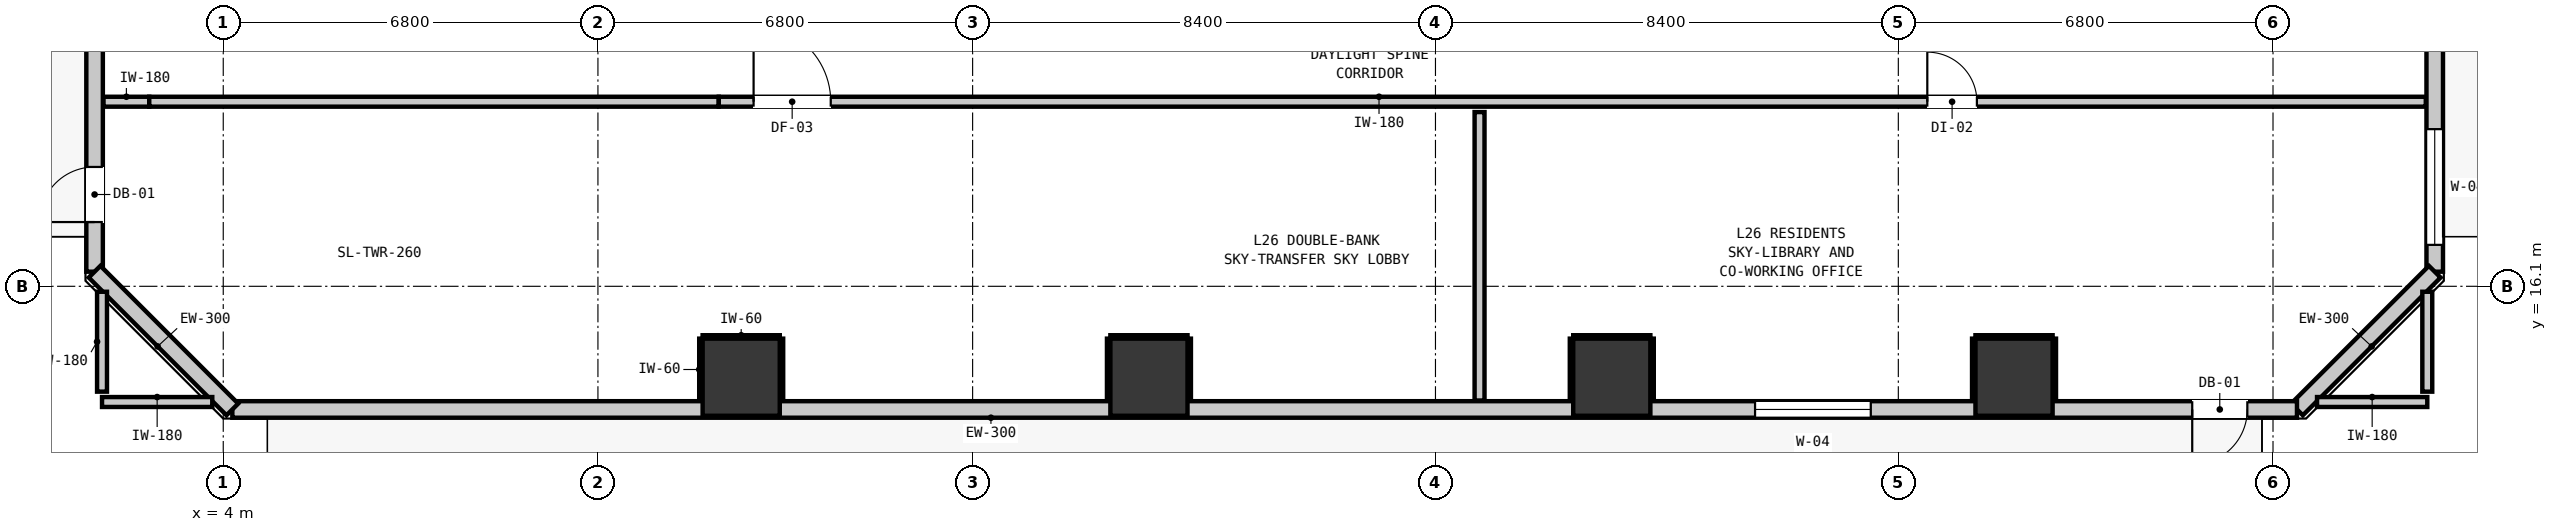
"""IFC4 building model, lengths in metres.
Left out: names, types, materials, properties, quantities, classifications, styles, units other than length and angle.
Written with IfcOpenShell. Run it as: python <this file> out.ifc"""

import sys

from ifc_helpers import new_model, si_unit, direction, frame, frame_2d, origin, origin_2d, place, context, subcontext, project, spatial, rectangle, extrude, element, fill, save


model = new_model("IFC4")
c1 = context("Model", 3, precision=1e-05, world=origin(), true_north=direction((0.0, 1.0)))
c2 = subcontext(c1, "Body", "Model", "MODEL_VIEW")
j1 = project(units=[si_unit("LENGTHUNIT", "METRE"), si_unit("PLANEANGLEUNIT", "RADIAN")], contexts=[c1])
p1 = place(None, origin())
s1 = spatial("IfcSite", under=j1, at=p1, CompositionType="ELEMENT")
p2 = place(p1, origin())
s2 = spatial("IfcBuilding", under=s1, at=p2, CompositionType="ELEMENT")
p3 = place(p2, frame((0.0, 0.0, 92.8)))
s3 = spatial("IfcBuildingStorey", under=s2, at=p3, CompositionType="ELEMENT", Elevation=92.8)
for number, where, z_axis, x_axis in (
    (1, (13.4, 14.45, 0.0), (0.0, 0.0, 1.0), (1.0, 0.0, 0.0)),
    (2, (20.8, 14.45, 0.0), (0.0, 0.0, 1.0), (1.0, 0.0, 0.0)),
    (3, (29.2, 14.45, 0.0), (0.0, 0.0, 1.0), (1.0, 0.0, 0.0)),
    (4, (36.5, 14.45, 0.0), (0.0, 0.0, 1.0), (1.0, 0.0, 0.0)),
):
    element("IfcColumn", number, at=place(p3, frame(where, z_axis=z_axis, x_axis=x_axis)), inside=s3, PredefinedType="COLUMN", context=c2, shape_type="SweptSolid", body=[
        extrude(rectangle(XDim=1.4, YDim=1.4, at=origin_2d()), origin(), (0.0, 0.0, 1.0), 3.32),
    ])
p4 = place(p3, frame((1.665, 16.365, 0.0), z_axis=(0.0, 0.0, 1.0), x_axis=(0.0, 1.0, 0.0)))
e5 = element("IfcWall", 5, at=p4, inside=s3, PredefinedType="STANDARD", context=c2, shape_type="SweptSolid", body=[
    extrude(rectangle(XDim=34.67, YDim=0.3, at=frame_2d((17.335, 0.0))), origin(), (0.0, 0.0, 1.0), 3.06),
])
p5 = place(p4, frame((0.901, 0.0, 0.0)))
e6 = element("IfcOpeningElement", 6, at=p5, cuts=e5, PredefinedType="OPENING", context=c2, shape_type="SweptSolid", body=[
    extrude(rectangle(XDim=1.0, YDim=2.15, at=frame_2d((0.5, 1.075))), frame((0.0, 0.16, 0.0), z_axis=(0.0, -1.0, 0.0), x_axis=(1.0, 0.0, 0.0)), (0.0, 0.0, 1.0), 0.32),
])
p6 = place(p4, frame((32.314, 0.0, 0.85)))
e7 = element("IfcOpeningElement", 7, at=p6, cuts=e5, PredefinedType="OPENING", context=c2, shape_type="SweptSolid", body=[
    extrude(rectangle(XDim=2.1, YDim=1.9, at=frame_2d((1.05, 0.95))), frame((0.0, 0.16, 0.0), z_axis=(0.0, -1.0, 0.0), x_axis=(1.0, 0.0, 0.0)), (0.0, 0.0, 1.0), 0.32),
])
p7 = place(p3, frame((44.135, 51.035, 0.0), z_axis=(0.0, 0.0, 1.0), x_axis=(0.0, -1.0, 0.0)))
e8 = element("IfcWall", 8, at=p7, inside=s3, PredefinedType="STANDARD", context=c2, shape_type="SweptSolid", body=[
    extrude(rectangle(XDim=34.67, YDim=0.3, at=frame_2d((17.335, 0.0))), origin(), (0.0, 0.0, 1.0), 3.06),
])
p8 = place(p7, frame((0.901, 0.0, 0.0)))
e9 = element("IfcOpeningElement", 9, at=p8, cuts=e8, PredefinedType="OPENING", context=c2, shape_type="SweptSolid", body=[
    extrude(rectangle(XDim=1.0, YDim=2.15, at=frame_2d((0.5, 1.075))), frame((0.0, 0.16, 0.0), z_axis=(0.0, -1.0, 0.0), x_axis=(1.0, 0.0, 0.0)), (0.0, 0.0, 1.0), 0.32),
])
p9 = place(p7, frame((32.083, 0.0, 0.85)))
e10 = element("IfcOpeningElement", 10, at=p9, cuts=e8, PredefinedType="OPENING", context=c2, shape_type="SweptSolid", body=[
    extrude(rectangle(XDim=2.1, YDim=1.9, at=frame_2d((1.05, 0.95))), frame((0.0, 0.16, 0.0), z_axis=(0.0, -1.0, 0.0), x_axis=(1.0, 0.0, 0.0)), (0.0, 0.0, 1.0), 0.32),
])
p10 = place(p7, frame((21.76, 0.0, 0.85)))
e11 = element("IfcOpeningElement", 11, at=p10, cuts=e8, PredefinedType="OPENING", context=c2, shape_type="SweptSolid", body=[
    extrude(rectangle(XDim=2.1, YDim=1.9, at=frame_2d((1.05, 0.95))), frame((0.0, 0.16, 0.0), z_axis=(0.0, -1.0, 0.0), x_axis=(1.0, 0.0, 0.0)), (0.0, 0.0, 1.0), 0.32),
])
p11 = place(p3, frame((44.135, 16.365, 0.0), z_axis=(0.0, 0.0, 1.0), x_axis=(-0.707106781187, -0.707106781187, 0.0)))
e12 = element("IfcWall", 12, at=p11, inside=s3, PredefinedType="STANDARD", context=c2, shape_type="SweptSolid", body=[
    extrude(rectangle(XDim=3.536, YDim=0.3, at=frame_2d((1.768, 0.0))), origin(), (0.0, 0.0, 1.0), 3.06),
])
p12 = place(p3, frame((41.635, 13.865, 0.0), z_axis=(0.0, 0.0, 1.0), x_axis=(-1.0, 0.0, 0.0)))
e13 = element("IfcWall", 13, at=p12, inside=s3, PredefinedType="STANDARD", context=c2, shape_type="SweptSolid", body=[
    extrude(rectangle(XDim=37.47, YDim=0.3, at=frame_2d((18.735, 0.0))), origin(), (0.0, 0.0, 1.0), 3.06),
])
p13 = place(p12, frame((0.901, 0.0, 0.0)))
e14 = element("IfcOpeningElement", 14, at=p13, cuts=e13, PredefinedType="OPENING", context=c2, shape_type="SweptSolid", body=[
    extrude(rectangle(XDim=1.0, YDim=2.15, at=frame_2d((0.5, 1.075))), frame((0.0, 0.16, 0.0), z_axis=(0.0, -1.0, 0.0), x_axis=(1.0, 0.0, 0.0)), (0.0, 0.0, 1.0), 0.32),
])
p14 = place(p12, frame((7.735, 0.0, 0.85)))
e15 = element("IfcOpeningElement", 15, at=p14, cuts=e13, PredefinedType="OPENING", context=c2, shape_type="SweptSolid", body=[
    extrude(rectangle(XDim=2.1, YDim=1.9, at=frame_2d((1.05, 0.95))), frame((0.0, 0.16, 0.0), z_axis=(0.0, -1.0, 0.0), x_axis=(1.0, 0.0, 0.0)), (0.0, 0.0, 1.0), 0.32),
])
p15 = place(p3, frame((4.165, 13.865, 0.0), z_axis=(0.0, 0.0, 1.0), x_axis=(-0.707106781187, 0.707106781187, 0.0)))
e16 = element("IfcWall", 16, at=p15, inside=s3, PredefinedType="STANDARD", context=c2, shape_type="SweptSolid", body=[
    extrude(rectangle(XDim=3.536, YDim=0.3, at=frame_2d((1.768, 0.0))), origin(), (0.0, 0.0, 1.0), 3.06),
])
for number, where, z_axis, x_axis in (
    (17, (1.8, 14.0, 0.0), (0.0, 0.0, 1.0), (1.0, 0.0, 0.0)),
    (18, (41.999, 14.0, 0.0), (0.0, 0.0, 1.0), (1.0, 0.0, 0.0)),
):
    element("IfcWall", number, at=place(p3, frame(where, z_axis=z_axis, x_axis=x_axis)), inside=s3, PredefinedType="PARTITIONING", context=c2, shape_type="SweptSolid", body=[
        extrude(rectangle(XDim=2.001, YDim=0.18, at=frame_2d((1.0, 0.0))), origin(), (0.0, 0.0, 1.0), 3.06),
    ])
p16 = place(p3, frame((1.827, 19.45, 0.0), z_axis=(0.0, 0.0, 1.0), x_axis=(1.0, 0.0, 0.0)))
e19 = element("IfcWall", 19, at=p16, inside=s3, PredefinedType="PARTITIONING", context=c2, shape_type="SweptSolid", body=[
    extrude(rectangle(XDim=0.83, YDim=0.18, at=frame_2d((0.415, 0.0))), origin(), (0.0, 0.0, 1.0), 3.06),
])
p17 = place(p3, frame((2.657, 19.45, 0.0), z_axis=(0.0, 0.0, 1.0), x_axis=(1.0, 0.0, 0.0)))
e20 = element("IfcWall", 20, at=p17, inside=s3, PredefinedType="PARTITIONING", context=c2, shape_type="SweptSolid", body=[
    extrude(rectangle(XDim=10.336, YDim=0.18, at=frame_2d((5.168, 0.0))), origin(), (0.0, 0.0, 1.0), 2.445),
])
p18 = place(p3, frame((12.993, 19.45, 0.0), z_axis=(0.0, 0.0, 1.0), x_axis=(1.0, 0.0, 0.0)))
e21 = element("IfcWall", 21, at=p18, inside=s3, PredefinedType="PARTITIONING", context=c2, shape_type="SweptSolid", body=[
    extrude(rectangle(XDim=30.98, YDim=0.18, at=frame_2d((15.49, 0.0))), origin(), (0.0, 0.0, 1.0), 3.06),
])
p19 = place(p18, frame((0.632, 0.0, 0.0)))
e22 = element("IfcOpeningElement", 22, at=p19, cuts=e21, PredefinedType="OPENING", context=c2, shape_type="SweptSolid", body=[
    extrude(rectangle(XDim=1.4, YDim=2.15, at=frame_2d((0.7, 1.075))), frame((0.0, 0.1, 0.0), z_axis=(0.0, -1.0, 0.0), x_axis=(1.0, 0.0, 0.0)), (0.0, 0.0, 1.0), 0.2),
])
p20 = place(p18, frame((21.933, 0.0, 0.0)))
e23 = element("IfcOpeningElement", 23, at=p20, cuts=e21, PredefinedType="OPENING", context=c2, shape_type="SweptSolid", body=[
    extrude(rectangle(XDim=0.9, YDim=2.1, at=frame_2d((0.45, 1.05))), frame((0.0, 0.1, 0.0), z_axis=(0.0, -1.0, 0.0), x_axis=(1.0, 0.0, 0.0)), (0.0, 0.0, 1.0), 0.2),
])
p21 = place(p3, frame((1.8, 14.188, 0.0), z_axis=(0.0, 0.0, 1.0), x_axis=(0.0, 1.0, 0.0)))
e24 = element("IfcWall", 24, at=p21, inside=s3, PredefinedType="PARTITIONING", context=c2, shape_type="SweptSolid", body=[
    extrude(rectangle(XDim=1.813, YDim=0.18, at=frame_2d((0.906, 0.0))), origin(), (0.0, 0.0, 1.0), 3.06),
])
p22 = place(p3, frame((26.8, 14.027, 0.0), z_axis=(0.0, 0.0, 1.0), x_axis=(0.0, 1.0, 0.0)))
e25 = element("IfcWall", 25, at=p22, inside=s3, PredefinedType="PARTITIONING", context=c2, shape_type="SweptSolid", body=[
    extrude(rectangle(XDim=5.235, YDim=0.18, at=frame_2d((2.617, 0.0))), origin(), (0.0, 0.0, 1.0), 3.06),
])
p23 = place(p3, frame((44.0, 14.188, 0.0), z_axis=(0.0, 0.0, 1.0), x_axis=(0.0, 1.0, 0.0)))
e26 = element("IfcWall", 26, at=p23, inside=s3, PredefinedType="PARTITIONING", context=c2, shape_type="SweptSolid", body=[
    extrude(rectangle(XDim=1.813, YDim=0.18, at=frame_2d((0.906, 0.0))), origin(), (0.0, 0.0, 1.0), 3.06),
])
p24 = place(p3, frame((12.7, 15.182, 0.0), z_axis=(0.0, 0.0, 1.0), x_axis=(1.0, 0.0, 0.0)))
e27 = element("IfcWall", 27, at=p24, inside=s3, PredefinedType="PARTITIONING", context=c2, shape_type="SweptSolid", body=[
    extrude(rectangle(XDim=1.4, YDim=0.06, at=frame_2d((0.7, 0.0))), origin(), (0.0, 0.0, 1.0), 1.45),
])
for number, where, z_axis, x_axis in (
    (28, (12.668, 14.03, 0.0), (0.0, 0.0, 1.0), (0.0, 1.0, 0.0)),
    (29, (14.132, 14.03, 0.0), (0.0, 0.0, 1.0), (0.0, 1.0, 0.0)),
):
    element("IfcWall", number, at=place(p3, frame(where, z_axis=z_axis, x_axis=x_axis)), inside=s3, PredefinedType="PARTITIONING", context=c2, shape_type="SweptSolid", body=[
        extrude(rectangle(XDim=1.12, YDim=0.06, at=frame_2d((0.56, 0.0))), origin(), (0.0, 0.0, 1.0), 1.45),
    ])
p25 = place(p3, frame((20.1, 15.182, 0.0), z_axis=(0.0, 0.0, 1.0), x_axis=(1.0, 0.0, 0.0)))
e30 = element("IfcWall", 30, at=p25, inside=s3, PredefinedType="PARTITIONING", context=c2, shape_type="SweptSolid", body=[
    extrude(rectangle(XDim=1.4, YDim=0.06, at=frame_2d((0.7, 0.0))), origin(), (0.0, 0.0, 1.0), 1.45),
])
for number, where, z_axis, x_axis in (
    (31, (20.068, 14.03, 0.0), (0.0, 0.0, 1.0), (0.0, 1.0, 0.0)),
    (32, (21.532, 14.03, 0.0), (0.0, 0.0, 1.0), (0.0, 1.0, 0.0)),
):
    element("IfcWall", number, at=place(p3, frame(where, z_axis=z_axis, x_axis=x_axis)), inside=s3, PredefinedType="PARTITIONING", context=c2, shape_type="SweptSolid", body=[
        extrude(rectangle(XDim=1.12, YDim=0.06, at=frame_2d((0.56, 0.0))), origin(), (0.0, 0.0, 1.0), 1.45),
    ])
p26 = place(p3, frame((28.5, 15.182, 0.0), z_axis=(0.0, 0.0, 1.0), x_axis=(1.0, 0.0, 0.0)))
e33 = element("IfcWall", 33, at=p26, inside=s3, PredefinedType="PARTITIONING", context=c2, shape_type="SweptSolid", body=[
    extrude(rectangle(XDim=1.4, YDim=0.06, at=frame_2d((0.7, 0.0))), origin(), (0.0, 0.0, 1.0), 1.45),
])
for number, where, z_axis, x_axis in (
    (34, (28.468, 14.03, 0.0), (0.0, 0.0, 1.0), (0.0, 1.0, 0.0)),
    (35, (29.932, 14.03, 0.0), (0.0, 0.0, 1.0), (0.0, 1.0, 0.0)),
):
    element("IfcWall", number, at=place(p3, frame(where, z_axis=z_axis, x_axis=x_axis)), inside=s3, PredefinedType="PARTITIONING", context=c2, shape_type="SweptSolid", body=[
        extrude(rectangle(XDim=1.12, YDim=0.06, at=frame_2d((0.56, 0.0))), origin(), (0.0, 0.0, 1.0), 1.45),
    ])
p27 = place(p3, frame((35.8, 15.182, 0.0), z_axis=(0.0, 0.0, 1.0), x_axis=(1.0, 0.0, 0.0)))
e36 = element("IfcWall", 36, at=p27, inside=s3, PredefinedType="PARTITIONING", context=c2, shape_type="SweptSolid", body=[
    extrude(rectangle(XDim=1.4, YDim=0.06, at=frame_2d((0.7, 0.0))), origin(), (0.0, 0.0, 1.0), 1.45),
])
for number, where, z_axis, x_axis in (
    (37, (35.768, 14.03, 0.0), (0.0, 0.0, 1.0), (0.0, 1.0, 0.0)),
    (38, (37.232, 14.03, 0.0), (0.0, 0.0, 1.0), (0.0, 1.0, 0.0)),
):
    element("IfcWall", number, at=place(p3, frame(where, z_axis=z_axis, x_axis=x_axis)), inside=s3, PredefinedType="PARTITIONING", context=c2, shape_type="SweptSolid", body=[
        extrude(rectangle(XDim=1.12, YDim=0.06, at=frame_2d((0.56, 0.0))), origin(), (0.0, 0.0, 1.0), 1.45),
    ])
p28 = place(p13, origin())
e39 = element("IfcDoor", 39, at=p28, inside=s3, OperationType="SINGLE_SWING_RIGHT", PredefinedType="DOOR", context=c2, shape_type="SweptSolid", body=[
    extrude(rectangle(XDim=1.0, YDim=2.15, at=frame_2d((0.5, 1.075))), frame((0.0, 0.025, 0.0), z_axis=(0.0, -1.0, 0.0), x_axis=(1.0, 0.0, 0.0)), (0.0, 0.0, 1.0), 0.05),
])
fill(e14, e39)
p29 = place(p5, origin())
e40 = element("IfcDoor", 40, at=p29, inside=s3, OperationType="SINGLE_SWING_LEFT", PredefinedType="DOOR", context=c2, shape_type="SweptSolid", body=[
    extrude(rectangle(XDim=1.0, YDim=2.15, at=frame_2d((0.5, 1.075))), frame((0.0, 0.025, 0.0), z_axis=(0.0, -1.0, 0.0), x_axis=(1.0, 0.0, 0.0)), (0.0, 0.0, 1.0), 0.05),
])
fill(e6, e40)
p30 = place(p9, origin())
e41 = element("IfcWindow", 41, at=p30, inside=s3, PartitioningType="SINGLE_PANEL", PredefinedType="WINDOW", context=c2, shape_type="SweptSolid", body=[
    extrude(rectangle(XDim=2.1, YDim=1.9, at=frame_2d((1.05, 0.95))), frame((0.0, 0.03, 0.0), z_axis=(0.0, -1.0, 0.0), x_axis=(1.0, 0.0, 0.0)), (0.0, 0.0, 1.0), 0.06),
])
fill(e10, e41)
p31 = place(p14, origin())
e42 = element("IfcWindow", 42, at=p31, inside=s3, PartitioningType="SINGLE_PANEL", PredefinedType="WINDOW", context=c2, shape_type="SweptSolid", body=[
    extrude(rectangle(XDim=2.1, YDim=1.9, at=frame_2d((1.05, 0.95))), frame((0.0, 0.03, 0.0), z_axis=(0.0, -1.0, 0.0), x_axis=(1.0, 0.0, 0.0)), (0.0, 0.0, 1.0), 0.06),
])
fill(e15, e42)
p32 = place(p19, origin())
e43 = element("IfcDoor", 43, at=p32, inside=s3, OperationType="SINGLE_SWING_LEFT", PredefinedType="DOOR", context=c2, shape_type="SweptSolid", body=[
    extrude(rectangle(XDim=1.4, YDim=2.15, at=frame_2d((0.7, 1.075))), frame((0.0, 0.025, 0.0), z_axis=(0.0, -1.0, 0.0), x_axis=(1.0, 0.0, 0.0)), (0.0, 0.0, 1.0), 0.05),
])
fill(e22, e43)
p33 = place(p20, origin())
e44 = element("IfcDoor", 44, at=p33, inside=s3, OperationType="SINGLE_SWING_LEFT", PredefinedType="DOOR", context=c2, shape_type="SweptSolid", body=[
    extrude(rectangle(XDim=0.9, YDim=2.1, at=frame_2d((0.45, 1.05))), frame((0.0, 0.025, 0.0), z_axis=(0.0, -1.0, 0.0), x_axis=(1.0, 0.0, 0.0)), (0.0, 0.0, 1.0), 0.05),
])
fill(e23, e44)
save(model, sys.argv[1])
